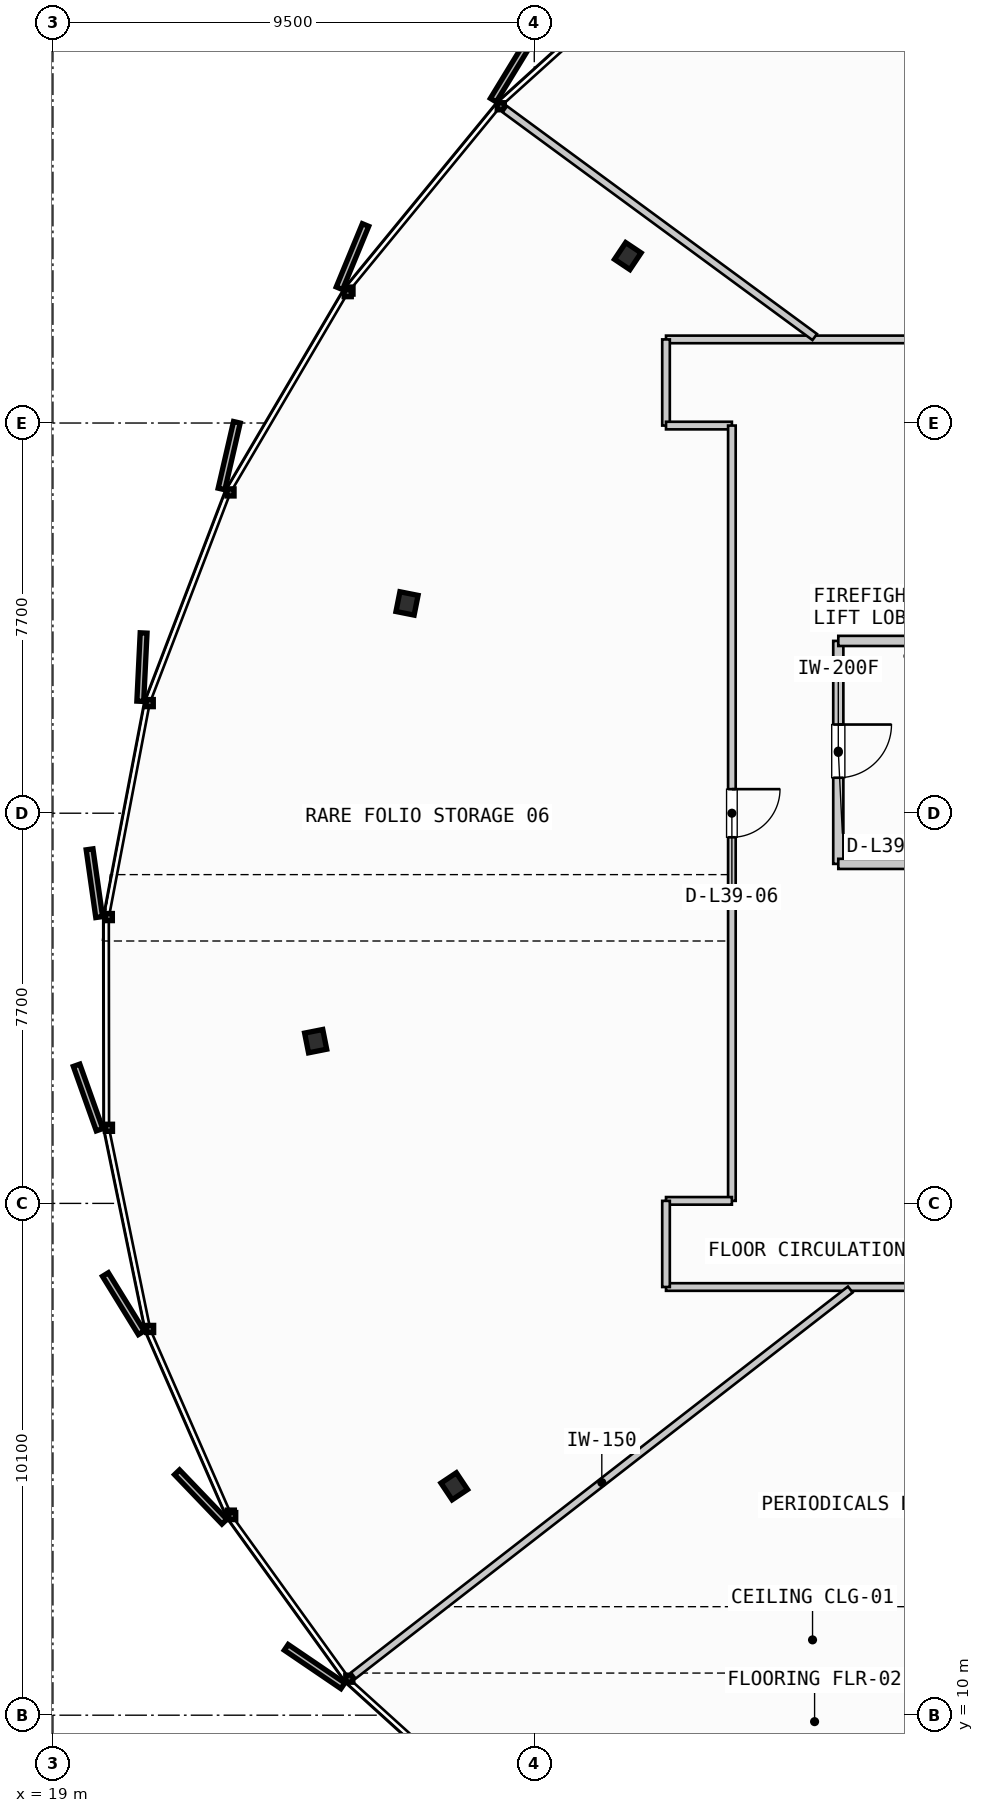
"""IFC4 building model, lengths in metres.
Left out: names, types, materials, properties, quantities, classifications, styles, units other than length and angle.
Written with IfcOpenShell. Run it as: python <this file> out.ifc"""

import sys

from ifc_helpers import new_model, si_unit, direction, frame, frame_2d, origin, origin_2d, place, context, subcontext, project, spatial, rectangle, i_section, extrude, source, transform, mapped, element, fill, save


model = new_model("IFC4")
c1 = context("Model", 3, precision=1e-05, world=origin(), true_north=direction((0.0, 1.0)))
c2 = subcontext(c1, "Body", "Model", "MODEL_VIEW")
j1 = project(units=[si_unit("LENGTHUNIT", "METRE"), si_unit("PLANEANGLEUNIT", "RADIAN")], contexts=[c1])
p1 = place(None, origin())
s1 = spatial("IfcSite", under=j1, at=p1, CompositionType="ELEMENT")
p2 = place(p1, origin())
s2 = spatial("IfcBuilding", under=s1, at=p2, CompositionType="ELEMENT")
p3 = place(p2, frame((0.0, 0.0, 153.65)))
s3 = spatial("IfcBuildingStorey", under=s2, at=p3, CompositionType="ELEMENT", Elevation=153.65)
m1 = source(origin(), c2, "Body", "SweptSolid", [
    extrude(i_section(OverallWidth=0.397, OverallDepth=0.365, WebThickness=0.028, FlangeThickness=0.044, FilletRadius=0.015, at=origin_2d()), origin(), (0.0, 0.0, 1.0), 3.3),
])
for number, where, z_axis, x_axis in (
    (1, (30.346, 38.794, 0.0), (0.0, 0.0, 1.0), (-0.831, 0.556, 0.0)),
    (2, (25.989, 31.94, 0.0), (0.0, 0.0, 1.0), (-0.981, 0.195, 0.0)),
    (3, (24.185, 23.302, 0.0), (0.0, 0.0, 1.0), (-0.981, -0.195, 0.0)),
    (4, (26.921, 14.517, 0.0), (0.0, 0.0, 1.0), (-0.831, -0.556, 0.0)),
):
    element("IfcColumn", number, at=place(p3, frame(where, z_axis=z_axis, x_axis=x_axis)), inside=s3, PredefinedType="COLUMN", context=c2, shape_type="MappedRepresentation", body=[
        mapped(m1, transform((0.0, 0.0, 0.0), scale=1.0)),
    ])
p4 = place(p3, frame((34.5, 31.2, 0.0), z_axis=(0.0, 0.0, 1.0), x_axis=(0.0, -1.0, 0.0)))
e5 = element("IfcWall", 5, at=p4, inside=s3, PredefinedType="PARTITIONING", context=c2, shape_type="SweptSolid", body=[
    extrude(rectangle(XDim=4.4, YDim=0.2, at=frame_2d((2.2, 0.0))), origin(), (0.0, 0.0, 1.0), 2.28),
])
p5 = place(p4, frame((1.65, 0.0, 0.0)))
e6 = element("IfcOpeningElement", 6, at=p5, cuts=e5, PredefinedType="OPENING", context=c2, shape_type="SweptSolid", body=[
    extrude(rectangle(XDim=1.05, YDim=2.15, at=frame_2d((0.525, 1.075))), frame((0.0, 0.11, 0.0), z_axis=(0.0, -1.0, 0.0), x_axis=(1.0, 0.0, 0.0)), (0.0, 0.0, 1.0), 0.22),
])
for number, where, z_axis, x_axis in (
    (7, (34.5, 26.8, 0.0), (0.0, 0.0, 1.0), (1.0, 0.0, 0.0)),
    (8, (34.5, 31.2, 0.0), (0.0, 0.0, 1.0), (1.0, 0.0, 0.0)),
):
    element("IfcWall", number, at=place(p3, frame(where, z_axis=z_axis, x_axis=x_axis)), inside=s3, PredefinedType="PARTITIONING", context=c2, shape_type="SweptSolid", body=[
        extrude(rectangle(XDim=3.215, YDim=0.2, at=frame_2d((1.607, 0.0))), origin(), (0.0, 0.0, 1.0), 2.28),
    ])
p6 = place(p3, frame((31.1, 18.45, 0.0), z_axis=(0.0, 0.0, 1.0), x_axis=(1.0, 0.0, 0.0)))
e9 = element("IfcWall", 9, at=p6, inside=s3, PredefinedType="PARTITIONING", context=c2, shape_type="SweptSolid", body=[
    extrude(rectangle(XDim=31.4, YDim=0.15, at=frame_2d((15.7, 0.0))), origin(), (0.0, 0.0, 1.0), 2.28),
])
p7 = place(p6, frame((7.8, 0.0, 0.0)))
e10 = element("IfcOpeningElement", 10, at=p7, cuts=e9, PredefinedType="OPENING", context=c2, shape_type="SweptSolid", body=[
    extrude(rectangle(XDim=0.95, YDim=2.15, at=frame_2d((0.475, 1.075))), frame((0.0, 0.085, 0.0), z_axis=(0.0, -1.0, 0.0), x_axis=(1.0, 0.0, 0.0)), (0.0, 0.0, 1.0), 0.17),
])
p8 = place(p6, frame((18.167, 0.0, 0.0)))
e11 = element("IfcOpeningElement", 11, at=p8, cuts=e9, PredefinedType="OPENING", context=c2, shape_type="SweptSolid", body=[
    extrude(rectangle(XDim=0.95, YDim=2.15, at=frame_2d((0.475, 1.075))), frame((0.0, 0.085, 0.0), z_axis=(0.0, -1.0, 0.0), x_axis=(1.0, 0.0, 0.0)), (0.0, 0.0, 1.0), 0.17),
])
p9 = place(p3, frame((62.5, 37.15, 0.0), z_axis=(0.0, 0.0, 1.0), x_axis=(-1.0, 0.0, 0.0)))
e12 = element("IfcWall", 12, at=p9, inside=s3, PredefinedType="PARTITIONING", context=c2, shape_type="SweptSolid", body=[
    extrude(rectangle(XDim=31.4, YDim=0.15, at=frame_2d((15.7, 0.0))), origin(), (0.0, 0.0, 1.0), 2.28),
])
p10 = place(p9, frame((7.432, 0.0, 0.0)))
e13 = element("IfcOpeningElement", 13, at=p10, cuts=e12, PredefinedType="OPENING", context=c2, shape_type="SweptSolid", body=[
    extrude(rectangle(XDim=0.95, YDim=2.15, at=frame_2d((0.475, 1.075))), frame((0.0, 0.085, 0.0), z_axis=(0.0, -1.0, 0.0), x_axis=(1.0, 0.0, 0.0)), (0.0, 0.0, 1.0), 0.17),
])
p11 = place(p9, frame((20.164, 0.0, 0.0)))
e14 = element("IfcOpeningElement", 14, at=p11, cuts=e12, PredefinedType="OPENING", context=c2, shape_type="SweptSolid", body=[
    extrude(rectangle(XDim=0.95, YDim=2.15, at=frame_2d((0.475, 1.075))), frame((0.0, 0.085, 0.0), z_axis=(0.0, -1.0, 0.0), x_axis=(1.0, 0.0, 0.0)), (0.0, 0.0, 1.0), 0.17),
])
p12 = place(p3, frame((31.1, 37.15, 0.0), z_axis=(0.0, 0.0, 1.0), x_axis=(0.0, -1.0, 0.0)))
e15 = element("IfcWall", 15, at=p12, inside=s3, PredefinedType="PARTITIONING", context=c2, shape_type="SweptSolid", body=[
    extrude(rectangle(XDim=1.7, YDim=0.15, at=frame_2d((0.85, 0.0))), origin(), (0.0, 0.0, 1.0), 2.28),
])
p13 = place(p3, frame((31.1, 35.45, 0.0), z_axis=(0.0, 0.0, 1.0), x_axis=(1.0, 0.0, 0.0)))
e16 = element("IfcWall", 16, at=p13, inside=s3, PredefinedType="PARTITIONING", context=c2, shape_type="SweptSolid", body=[
    extrude(rectangle(XDim=1.3, YDim=0.15, at=frame_2d((0.65, 0.0))), origin(), (0.0, 0.0, 1.0), 2.28),
])
p14 = place(p3, frame((32.4, 35.45, 0.0), z_axis=(0.0, 0.0, 1.0), x_axis=(0.0, -1.0, 0.0)))
e17 = element("IfcWall", 17, at=p14, inside=s3, PredefinedType="PARTITIONING", context=c2, shape_type="SweptSolid", body=[
    extrude(rectangle(XDim=15.3, YDim=0.15, at=frame_2d((7.65, 0.0))), origin(), (0.0, 0.0, 1.0), 2.28),
])
p15 = place(p14, frame((7.175, 0.0, 0.0)))
e18 = element("IfcOpeningElement", 18, at=p15, cuts=e17, PredefinedType="OPENING", context=c2, shape_type="SweptSolid", body=[
    extrude(rectangle(XDim=0.95, YDim=2.15, at=frame_2d((0.475, 1.075))), frame((0.0, 0.085, 0.0), z_axis=(0.0, -1.0, 0.0), x_axis=(1.0, 0.0, 0.0)), (0.0, 0.0, 1.0), 0.17),
])
p16 = place(p3, frame((32.4, 20.15, 0.0), z_axis=(0.0, 0.0, 1.0), x_axis=(-1.0, 0.0, 0.0)))
e19 = element("IfcWall", 19, at=p16, inside=s3, PredefinedType="PARTITIONING", context=c2, shape_type="SweptSolid", body=[
    extrude(rectangle(XDim=1.3, YDim=0.15, at=frame_2d((0.65, 0.0))), origin(), (0.0, 0.0, 1.0), 2.28),
])
p17 = place(p3, frame((31.1, 20.15, 0.0), z_axis=(0.0, 0.0, 1.0), x_axis=(0.0, -1.0, 0.0)))
e20 = element("IfcWall", 20, at=p17, inside=s3, PredefinedType="PARTITIONING", context=c2, shape_type="SweptSolid", body=[
    extrude(rectangle(XDim=1.7, YDim=0.15, at=frame_2d((0.85, 0.0))), origin(), (0.0, 0.0, 1.0), 2.28),
])
p18 = place(p3, frame((34.737, 18.401, 0.0), z_axis=(0.0, 0.0, 1.0), x_axis=(-0.789733105582, -0.613450586395, 0.0)))
e21 = element("IfcWall", 21, at=p18, inside=s3, PredefinedType="PARTITIONING", context=c2, shape_type="SweptSolid", body=[
    extrude(rectangle(XDim=12.42, YDim=0.15, at=frame_2d((6.21, 0.0))), origin(), (0.0, 0.0, 1.0), 2.28),
])
p19 = place(p3, frame((34.035, 37.198, 0.0), z_axis=(0.0, 0.0, 1.0), x_axis=(-0.805757118537, 0.592246119386, 0.0)))
e22 = element("IfcWall", 22, at=p19, inside=s3, PredefinedType="PARTITIONING", context=c2, shape_type="SweptSolid", body=[
    extrude(rectangle(XDim=7.589, YDim=0.15, at=frame_2d((3.794, 0.0))), origin(), (0.0, 0.0, 1.0), 2.28),
])
m2 = source(origin(), c2, "Body", "SweptSolid", [
    extrude(rectangle(XDim=1.05, YDim=2.15, at=frame_2d((0.525, 1.075))), frame((0.0, 0.025, 0.0), z_axis=(0.0, -1.0, 0.0), x_axis=(1.0, 0.0, 0.0)), (0.0, 0.0, 1.0), 0.05),
])
p20 = place(p5, origin())
e23 = element("IfcDoor", 23, at=p20, inside=s3, OperationType="SINGLE_SWING_LEFT", PredefinedType="DOOR", context=c2, shape_type="MappedRepresentation", body=[
    mapped(m2, transform((0.0, 0.0, 0.0), scale=1.0)),
])
fill(e6, e23)
m3 = source(origin(), c2, "Body", "SweptSolid", [
    extrude(rectangle(XDim=0.95, YDim=2.15, at=frame_2d((0.475, 1.075))), frame((0.0, 0.025, 0.0), z_axis=(0.0, -1.0, 0.0), x_axis=(1.0, 0.0, 0.0)), (0.0, 0.0, 1.0), 0.05),
])
p21 = place(p15, origin())
e24 = element("IfcDoor", 24, at=p21, inside=s3, OperationType="SINGLE_SWING_LEFT", PredefinedType="DOOR", context=c2, shape_type="MappedRepresentation", body=[
    mapped(m3, transform((0.0, 0.0, 0.0), scale=1.0)),
])
fill(e18, e24)
save(model, sys.argv[1])
